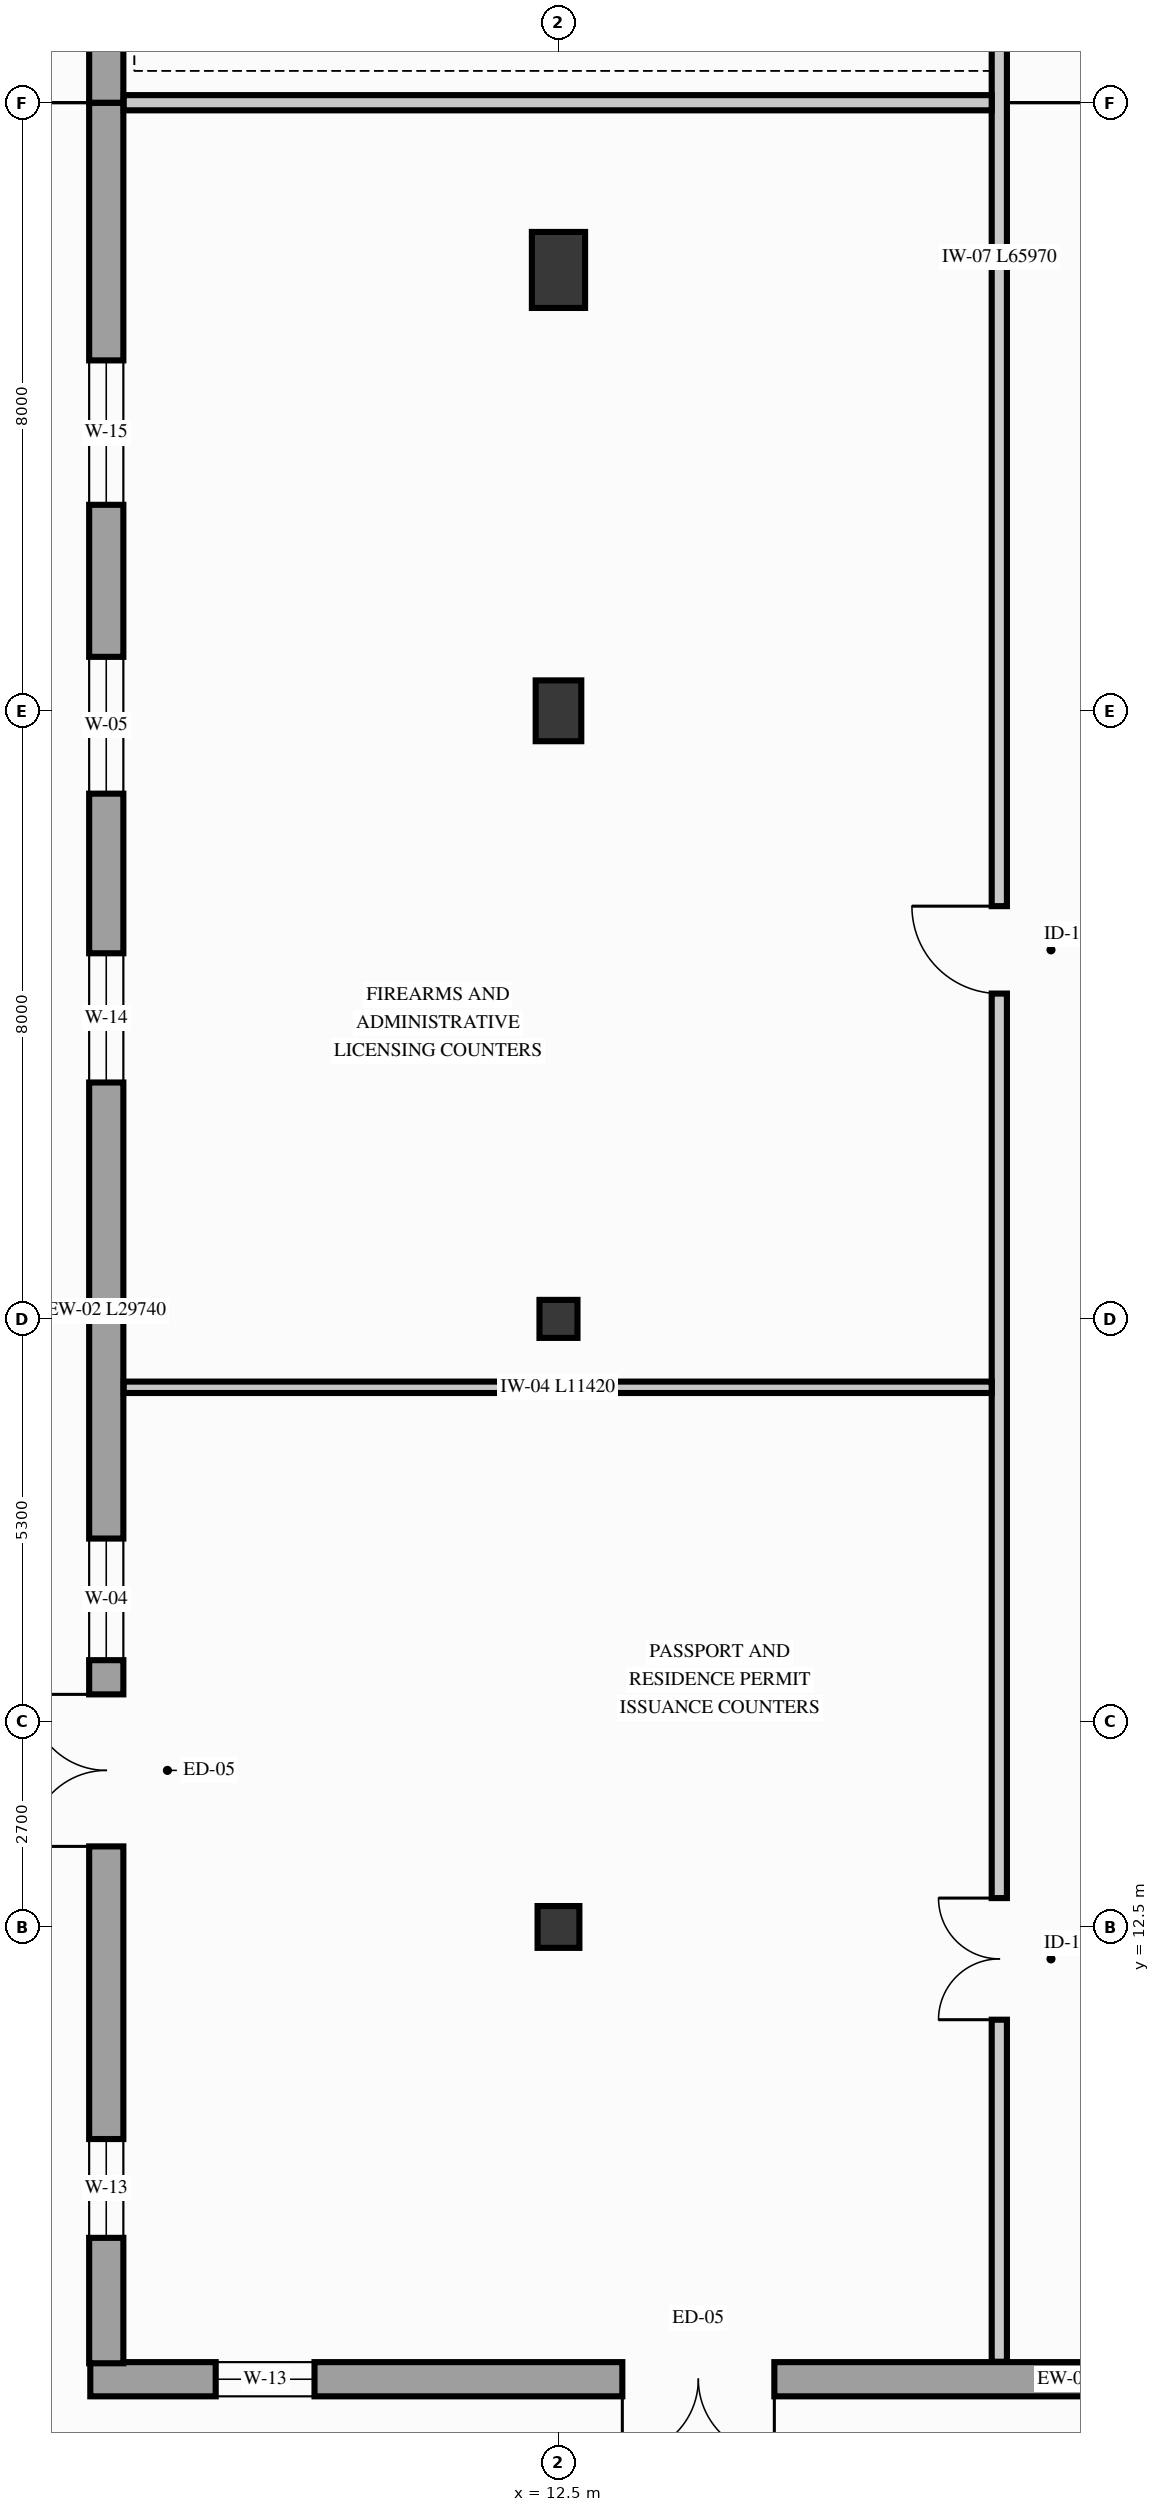
"""IFC4 building model, lengths in metres.
Left out: names, types, materials, properties, quantities, classifications, styles, units other than length and angle.
Written with IfcOpenShell. Run it as: python <this file> out.ifc"""

import sys

from ifc_helpers import new_model, si_unit, direction, frame, frame_2d, origin, origin_2d, place, context, subcontext, project, spatial, rectangle, extrude, element, fill, save


model = new_model("IFC4")
c1 = context("Model", 3, precision=1e-05, world=origin(), true_north=direction((0.0, 1.0)))
c2 = subcontext(c1, "Body", "Model", "MODEL_VIEW")
j1 = project(units=[si_unit("LENGTHUNIT", "METRE"), si_unit("PLANEANGLEUNIT", "RADIAN")], contexts=[c1])
p1 = place(None, origin())
s1 = spatial("IfcSite", under=j1, at=p1, CompositionType="ELEMENT")
p2 = place(p1, origin())
s2 = spatial("IfcBuilding", under=s1, at=p2, CompositionType="ELEMENT")
p3 = place(p2, origin())
s3 = spatial("IfcBuildingStorey", under=s2, at=p3, CompositionType="ELEMENT", Elevation=0.0)
p4 = place(p3, frame((12.5, 12.5, 0.0), z_axis=(0.0, 0.0, 1.0), x_axis=(1.0, 0.0, 0.0)))
e1 = element("IfcColumn", 1, at=p4, inside=s3, PredefinedType="COLUMN", context=c2, shape_type="SweptSolid", body=[
    extrude(rectangle(XDim=0.55, YDim=0.55, at=origin_2d()), origin(), (0.0, 0.0, 1.0), 5.1),
])
p5 = place(p3, frame((12.5, 20.5, 0.0), z_axis=(0.0, 0.0, 1.0), x_axis=(1.0, 0.0, 0.0)))
e2 = element("IfcColumn", 2, at=p5, inside=s3, PredefinedType="COLUMN", context=c2, shape_type="SweptSolid", body=[
    extrude(rectangle(XDim=0.5, YDim=0.5, at=origin_2d()), origin(), (0.0, 0.0, 1.0), 5.1),
])
p6 = place(p3, frame((12.5, 28.5, 0.0), z_axis=(0.0, 0.0, 1.0), x_axis=(1.0, 0.0, 0.0)))
e3 = element("IfcColumn", 3, at=p6, inside=s3, PredefinedType="COLUMN", context=c2, shape_type="SweptSolid", body=[
    extrude(rectangle(XDim=0.6, YDim=0.8, at=origin_2d()), origin(), (0.0, 0.0, 1.0), 5.1),
])
p7 = place(p3, frame((12.5, 34.3, 0.0), z_axis=(0.0, 0.0, 1.0), x_axis=(1.0, 0.0, 0.0)))
e4 = element("IfcColumn", 4, at=p7, inside=s3, PredefinedType="COLUMN", context=c2, shape_type="SweptSolid", body=[
    extrude(rectangle(XDim=0.7, YDim=1.0, at=origin_2d()), origin(), (0.0, 0.0, 1.0), 5.1),
])
p8 = place(p3, frame((6.34, 6.55, 0.0), z_axis=(0.0, 0.0, 1.0), x_axis=(1.0, 0.0, 0.0)))
e5 = element("IfcWall", 5, at=p8, inside=s3, PredefinedType="SOLIDWALL", context=c2, shape_type="SweptSolid", body=[
    extrude(rectangle(XDim=28.25, YDim=0.45, at=frame_2d((14.125, 0.0))), origin(), (0.0, 0.0, 1.0), 4.428),
])
p9 = place(p8, frame((9.0, 0.0, 0.0), z_axis=(0.0, 0.0, 1.0), x_axis=(-1.0, 0.0, 0.0)))
e6 = element("IfcOpeningElement", 6, at=p9, cuts=e5, PredefinedType="OPENING", context=c2, shape_type="SweptSolid", body=[
    extrude(rectangle(XDim=2.0, YDim=2.5, at=frame_2d((1.0, 1.25))), frame((0.0, 0.235, 0.0), z_axis=(0.0, -1.0, 0.0), x_axis=(1.0, 0.0, 0.0)), (0.0, 0.0, 1.0), 0.47),
])
p10 = place(p8, frame((18.7, 0.0, 0.0), z_axis=(0.0, 0.0, 1.0), x_axis=(-1.0, 0.0, 0.0)))
e7 = element("IfcOpeningElement", 7, at=p10, cuts=e5, PredefinedType="OPENING", context=c2, shape_type="SweptSolid", body=[
    extrude(rectangle(XDim=1.2, YDim=2.3, at=frame_2d((0.6, 1.15))), frame((0.0, 0.235, 0.0), z_axis=(0.0, -1.0, 0.0), x_axis=(1.0, 0.0, 0.0)), (0.0, 0.0, 1.0), 0.47),
])
p11 = place(p8, frame((1.65, 0.0, 0.85)))
e8 = element("IfcOpeningElement", 8, at=p11, cuts=e5, PredefinedType="OPENING", context=c2, shape_type="SweptSolid", body=[
    extrude(rectangle(XDim=1.3, YDim=2.15, at=frame_2d((0.65, 1.075))), frame((0.0, 0.235, 0.0), z_axis=(0.0, -1.0, 0.0), x_axis=(1.0, 0.0, 0.0)), (0.0, 0.0, 1.0), 0.47),
])
p12 = place(p8, frame((20.65, 0.0, 0.85)))
e9 = element("IfcOpeningElement", 9, at=p12, cuts=e5, PredefinedType="OPENING", context=c2, shape_type="SweptSolid", body=[
    extrude(rectangle(XDim=1.8, YDim=2.4, at=frame_2d((0.9, 1.2))), frame((0.0, 0.235, 0.0), z_axis=(0.0, -1.0, 0.0), x_axis=(1.0, 0.0, 0.0)), (0.0, 0.0, 1.0), 0.47),
])
p13 = place(p8, frame((24.45, 0.0, 0.85)))
e10 = element("IfcOpeningElement", 10, at=p13, cuts=e5, PredefinedType="OPENING", context=c2, shape_type="SweptSolid", body=[
    extrude(rectangle(XDim=1.9, YDim=2.45, at=frame_2d((0.95, 1.225))), frame((0.0, 0.235, 0.0), z_axis=(0.0, -1.0, 0.0), x_axis=(1.0, 0.0, 0.0)), (0.0, 0.0, 1.0), 0.47),
])
p14 = place(p3, frame((6.55, 6.76, 0.0), z_axis=(0.0, 0.0, 1.0), x_axis=(0.0, 1.0, 0.0)))
e11 = element("IfcWall", 11, at=p14, inside=s3, PredefinedType="SOLIDWALL", context=c2, shape_type="SweptSolid", body=[
    extrude(rectangle(XDim=29.74, YDim=0.45, at=frame_2d((14.87, 0.0))), origin(), (0.0, 0.0, 1.0), 4.418),
])
p15 = place(p14, frame((6.8, 0.0, 0.0)))
e12 = element("IfcOpeningElement", 12, at=p15, cuts=e11, PredefinedType="OPENING", context=c2, shape_type="SweptSolid", body=[
    extrude(rectangle(XDim=2.0, YDim=2.5, at=frame_2d((1.0, 1.25))), frame((0.0, 0.235, 0.0), z_axis=(0.0, -1.0, 0.0), x_axis=(1.0, 0.0, 0.0)), (0.0, 0.0, 1.0), 0.47),
])
p16 = place(p14, frame((1.65, 0.0, 0.85)))
e13 = element("IfcOpeningElement", 13, at=p16, cuts=e11, PredefinedType="OPENING", context=c2, shape_type="SweptSolid", body=[
    extrude(rectangle(XDim=1.3, YDim=2.15, at=frame_2d((0.65, 1.075))), frame((0.0, 0.235, 0.0), z_axis=(0.0, -1.0, 0.0), x_axis=(1.0, 0.0, 0.0)), (0.0, 0.0, 1.0), 0.47),
])
p17 = place(p14, frame((9.25, 0.0, 0.85)))
e14 = element("IfcOpeningElement", 14, at=p17, cuts=e11, PredefinedType="OPENING", context=c2, shape_type="SweptSolid", body=[
    extrude(rectangle(XDim=1.6, YDim=2.4, at=frame_2d((0.8, 1.2))), frame((0.0, 0.235, 0.0), z_axis=(0.0, -1.0, 0.0), x_axis=(1.0, 0.0, 0.0)), (0.0, 0.0, 1.0), 0.47),
])
p18 = place(p14, frame((16.85, 0.0, 0.85)))
e15 = element("IfcOpeningElement", 15, at=p18, cuts=e11, PredefinedType="OPENING", context=c2, shape_type="SweptSolid", body=[
    extrude(rectangle(XDim=1.7, YDim=2.35, at=frame_2d((0.85, 1.175))), frame((0.0, 0.235, 0.0), z_axis=(0.0, -1.0, 0.0), x_axis=(1.0, 0.0, 0.0)), (0.0, 0.0, 1.0), 0.47),
])
p19 = place(p14, frame((20.65, 0.0, 0.85)))
e16 = element("IfcOpeningElement", 16, at=p19, cuts=e11, PredefinedType="OPENING", context=c2, shape_type="SweptSolid", body=[
    extrude(rectangle(XDim=1.8, YDim=2.4, at=frame_2d((0.9, 1.2))), frame((0.0, 0.235, 0.0), z_axis=(0.0, -1.0, 0.0), x_axis=(1.0, 0.0, 0.0)), (0.0, 0.0, 1.0), 0.47),
])
p20 = place(p14, frame((24.45, 0.0, 0.85)))
e17 = element("IfcOpeningElement", 17, at=p20, cuts=e11, PredefinedType="OPENING", context=c2, shape_type="SweptSolid", body=[
    extrude(rectangle(XDim=1.9, YDim=2.45, at=frame_2d((0.95, 1.225))), frame((0.0, 0.235, 0.0), z_axis=(0.0, -1.0, 0.0), x_axis=(1.0, 0.0, 0.0)), (0.0, 0.0, 1.0), 0.47),
])
p21 = place(p3, frame((6.55, 36.5, 0.0), z_axis=(0.0, 0.0, 1.0), x_axis=(0.0, 1.0, 0.0)))
e18 = element("IfcWall", 18, at=p21, inside=s3, PredefinedType="SOLIDWALL", context=c2, shape_type="SweptSolid", body=[
    extrude(rectangle(XDim=47.0, YDim=0.45, at=frame_2d((23.5, 0.0))), origin(), (0.0, 0.0, 1.0), 4.368),
])
p22 = place(p21, frame((40.5, 0.0, 0.0)))
e19 = element("IfcOpeningElement", 19, at=p22, cuts=e18, PredefinedType="OPENING", context=c2, shape_type="SweptSolid", body=[
    extrude(rectangle(XDim=1.8, YDim=2.4, at=frame_2d((0.9, 1.2))), frame((0.0, 0.235, 0.0), z_axis=(0.0, -1.0, 0.0), x_axis=(1.0, 0.0, 0.0)), (0.0, 0.0, 1.0), 0.47),
])
p23 = place(p21, frame((1.65, 0.0, 0.85)))
e20 = element("IfcOpeningElement", 20, at=p23, cuts=e18, PredefinedType="OPENING", context=c2, shape_type="SweptSolid", body=[
    extrude(rectangle(XDim=1.6, YDim=2.4, at=frame_2d((0.8, 1.2))), frame((0.0, 0.235, 0.0), z_axis=(0.0, -1.0, 0.0), x_axis=(1.0, 0.0, 0.0)), (0.0, 0.0, 1.0), 0.47),
])
p24 = place(p21, frame((5.5, 0.0, 0.85)))
e21 = element("IfcOpeningElement", 21, at=p24, cuts=e18, PredefinedType="OPENING", context=c2, shape_type="SweptSolid", body=[
    extrude(rectangle(XDim=1.8, YDim=2.4, at=frame_2d((0.9, 1.2))), frame((0.0, 0.235, 0.0), z_axis=(0.0, -1.0, 0.0), x_axis=(1.0, 0.0, 0.0)), (0.0, 0.0, 1.0), 0.47),
])
p25 = place(p21, frame((9.35, 0.0, 0.85)))
e22 = element("IfcOpeningElement", 22, at=p25, cuts=e18, PredefinedType="OPENING", context=c2, shape_type="SweptSolid", body=[
    extrude(rectangle(XDim=1.5, YDim=2.3, at=frame_2d((0.75, 1.15))), frame((0.0, 0.235, 0.0), z_axis=(0.0, -1.0, 0.0), x_axis=(1.0, 0.0, 0.0)), (0.0, 0.0, 1.0), 0.47),
])
p26 = place(p21, frame((13.2, 0.0, 0.85)))
e23 = element("IfcOpeningElement", 23, at=p26, cuts=e18, PredefinedType="OPENING", context=c2, shape_type="SweptSolid", body=[
    extrude(rectangle(XDim=1.4, YDim=2.2, at=frame_2d((0.7, 1.1))), frame((0.0, 0.235, 0.0), z_axis=(0.0, -1.0, 0.0), x_axis=(1.0, 0.0, 0.0)), (0.0, 0.0, 1.0), 0.47),
])
p27 = place(p21, frame((24.75, 0.0, 0.85)))
e24 = element("IfcOpeningElement", 24, at=p27, cuts=e18, PredefinedType="OPENING", context=c2, shape_type="SweptSolid", body=[
    extrude(rectangle(XDim=1.6, YDim=2.4, at=frame_2d((0.8, 1.2))), frame((0.0, 0.235, 0.0), z_axis=(0.0, -1.0, 0.0), x_axis=(1.0, 0.0, 0.0)), (0.0, 0.0, 1.0), 0.47),
])
p28 = place(p21, frame((28.6, 0.0, 0.85)))
e25 = element("IfcOpeningElement", 25, at=p28, cuts=e18, PredefinedType="OPENING", context=c2, shape_type="SweptSolid", body=[
    extrude(rectangle(XDim=1.8, YDim=2.4, at=frame_2d((0.9, 1.2))), frame((0.0, 0.235, 0.0), z_axis=(0.0, -1.0, 0.0), x_axis=(1.0, 0.0, 0.0)), (0.0, 0.0, 1.0), 0.47),
])
p29 = place(p21, frame((32.45, 0.0, 0.85)))
e26 = element("IfcOpeningElement", 26, at=p29, cuts=e18, PredefinedType="OPENING", context=c2, shape_type="SweptSolid", body=[
    extrude(rectangle(XDim=1.5, YDim=2.3, at=frame_2d((0.75, 1.15))), frame((0.0, 0.235, 0.0), z_axis=(0.0, -1.0, 0.0), x_axis=(1.0, 0.0, 0.0)), (0.0, 0.0, 1.0), 0.47),
])
p30 = place(p3, frame((18.3, 6.78, 0.0), z_axis=(0.0, 0.0, 1.0), x_axis=(0.0, 1.0, 0.0)))
e27 = element("IfcWall", 27, at=p30, inside=s3, PredefinedType="PARTITIONING", context=c2, shape_type="SweptSolid", body=[
    extrude(rectangle(XDim=65.97, YDim=0.2, at=frame_2d((32.985, 0.0))), origin(), (0.0, 0.0, 1.0), 4.368),
])
p31 = place(p30, frame((4.5, 0.0, 0.0)))
e28 = element("IfcOpeningElement", 28, at=p31, cuts=e27, PredefinedType="OPENING", context=c2, shape_type="SweptSolid", body=[
    extrude(rectangle(XDim=1.6, YDim=2.3, at=frame_2d((0.8, 1.15))), frame((0.0, 0.11, 0.0), z_axis=(0.0, -1.0, 0.0), x_axis=(1.0, 0.0, 0.0)), (0.0, 0.0, 1.0), 0.22),
])
p32 = place(p30, frame((18.0, 0.0, 0.0)))
e29 = element("IfcOpeningElement", 29, at=p32, cuts=e27, PredefinedType="OPENING", context=c2, shape_type="SweptSolid", body=[
    extrude(rectangle(XDim=1.15, YDim=2.2, at=frame_2d((0.575, 1.1))), frame((0.0, 0.11, 0.0), z_axis=(0.0, -1.0, 0.0), x_axis=(1.0, 0.0, 0.0)), (0.0, 0.0, 1.0), 0.22),
])
p33 = place(p30, frame((38.0, 0.0, 0.0)))
e30 = element("IfcOpeningElement", 30, at=p33, cuts=e27, PredefinedType="OPENING", context=c2, shape_type="SweptSolid", body=[
    extrude(rectangle(XDim=0.98, YDim=2.16, at=frame_2d((0.49, 1.08))), frame((0.0, 0.11, 0.0), z_axis=(0.0, -1.0, 0.0), x_axis=(1.0, 0.0, 0.0)), (0.0, 0.0, 1.0), 0.22),
])
p34 = place(p30, frame((56.0, 0.0, 0.0)))
e31 = element("IfcOpeningElement", 31, at=p34, cuts=e27, PredefinedType="OPENING", context=c2, shape_type="SweptSolid", body=[
    extrude(rectangle(XDim=1.15, YDim=2.2, at=frame_2d((0.575, 1.1))), frame((0.0, 0.11, 0.0), z_axis=(0.0, -1.0, 0.0), x_axis=(1.0, 0.0, 0.0)), (0.0, 0.0, 1.0), 0.22),
])
p35 = place(p3, frame((6.78, 19.6, 0.0), z_axis=(0.0, 0.0, 1.0), x_axis=(1.0, 0.0, 0.0)))
e32 = element("IfcWall", 32, at=p35, inside=s3, PredefinedType="PARTITIONING", context=c2, shape_type="SweptSolid", body=[
    extrude(rectangle(XDim=11.42, YDim=0.15, at=frame_2d((5.71, 0.0))), origin(), (0.0, 0.0, 1.0), 4.428),
])
p36 = place(p3, frame((6.78, 36.5, 0.0), z_axis=(0.0, 0.0, 1.0), x_axis=(1.0, 0.0, 0.0)))
e33 = element("IfcWall", 33, at=p36, inside=s3, PredefinedType="PARTITIONING", context=c2, shape_type="SweptSolid", body=[
    extrude(rectangle(XDim=11.42, YDim=0.2, at=frame_2d((5.71, 0.0))), origin(), (0.0, 0.0, 1.0), 4.86),
])
p37 = place(p9, origin())
e34 = element("IfcDoor", 34, at=p37, inside=s3, OperationType="DOUBLE_DOOR_SINGLE_SWING", PredefinedType="DOOR", context=c2, shape_type="SweptSolid", body=[
    extrude(rectangle(XDim=2.0, YDim=2.5, at=frame_2d((1.0, 1.25))), frame((0.0, 0.025, 0.0), z_axis=(0.0, -1.0, 0.0), x_axis=(1.0, 0.0, 0.0)), (0.0, 0.0, 1.0), 0.05),
])
fill(e6, e34)
p38 = place(p15, origin())
e35 = element("IfcDoor", 35, at=p38, inside=s3, OperationType="DOUBLE_DOOR_SINGLE_SWING", PredefinedType="DOOR", context=c2, shape_type="SweptSolid", body=[
    extrude(rectangle(XDim=2.0, YDim=2.5, at=frame_2d((1.0, 1.25))), frame((0.0, 0.025, 0.0), z_axis=(0.0, -1.0, 0.0), x_axis=(1.0, 0.0, 0.0)), (0.0, 0.0, 1.0), 0.05),
])
fill(e12, e35)
p39 = place(p11, origin())
e36 = element("IfcWindow", 36, at=p39, inside=s3, PartitioningType="SINGLE_PANEL", PredefinedType="WINDOW", context=c2, shape_type="SweptSolid", body=[
    extrude(rectangle(XDim=1.3, YDim=2.15, at=frame_2d((0.65, 1.075))), frame((0.0, 0.03, 0.0), z_axis=(0.0, -1.0, 0.0), x_axis=(1.0, 0.0, 0.0)), (0.0, 0.0, 1.0), 0.06),
])
fill(e8, e36)
p40 = place(p16, origin())
e37 = element("IfcWindow", 37, at=p40, inside=s3, PartitioningType="SINGLE_PANEL", PredefinedType="WINDOW", context=c2, shape_type="SweptSolid", body=[
    extrude(rectangle(XDim=1.3, YDim=2.15, at=frame_2d((0.65, 1.075))), frame((0.0, 0.03, 0.0), z_axis=(0.0, -1.0, 0.0), x_axis=(1.0, 0.0, 0.0)), (0.0, 0.0, 1.0), 0.06),
])
fill(e13, e37)
p41 = place(p17, origin())
e38 = element("IfcWindow", 38, at=p41, inside=s3, PartitioningType="SINGLE_PANEL", PredefinedType="WINDOW", context=c2, shape_type="SweptSolid", body=[
    extrude(rectangle(XDim=1.6, YDim=2.4, at=frame_2d((0.8, 1.2))), frame((0.0, 0.03, 0.0), z_axis=(0.0, -1.0, 0.0), x_axis=(1.0, 0.0, 0.0)), (0.0, 0.0, 1.0), 0.06),
])
fill(e14, e38)
p42 = place(p18, origin())
e39 = element("IfcWindow", 39, at=p42, inside=s3, PartitioningType="SINGLE_PANEL", PredefinedType="WINDOW", context=c2, shape_type="SweptSolid", body=[
    extrude(rectangle(XDim=1.7, YDim=2.35, at=frame_2d((0.85, 1.175))), frame((0.0, 0.03, 0.0), z_axis=(0.0, -1.0, 0.0), x_axis=(1.0, 0.0, 0.0)), (0.0, 0.0, 1.0), 0.06),
])
fill(e15, e39)
p43 = place(p19, origin())
e40 = element("IfcWindow", 40, at=p43, inside=s3, PartitioningType="SINGLE_PANEL", PredefinedType="WINDOW", context=c2, shape_type="SweptSolid", body=[
    extrude(rectangle(XDim=1.8, YDim=2.4, at=frame_2d((0.9, 1.2))), frame((0.0, 0.03, 0.0), z_axis=(0.0, -1.0, 0.0), x_axis=(1.0, 0.0, 0.0)), (0.0, 0.0, 1.0), 0.06),
])
fill(e16, e40)
p44 = place(p20, origin())
e41 = element("IfcWindow", 41, at=p44, inside=s3, PartitioningType="SINGLE_PANEL", PredefinedType="WINDOW", context=c2, shape_type="SweptSolid", body=[
    extrude(rectangle(XDim=1.9, YDim=2.45, at=frame_2d((0.95, 1.225))), frame((0.0, 0.03, 0.0), z_axis=(0.0, -1.0, 0.0), x_axis=(1.0, 0.0, 0.0)), (0.0, 0.0, 1.0), 0.06),
])
fill(e17, e41)
p45 = place(p31, origin())
e42 = element("IfcDoor", 42, at=p45, inside=s3, OperationType="DOUBLE_DOOR_SINGLE_SWING", PredefinedType="DOOR", context=c2, shape_type="SweptSolid", body=[
    extrude(rectangle(XDim=1.6, YDim=2.3, at=frame_2d((0.8, 1.15))), frame((0.0, 0.025, 0.0), z_axis=(0.0, -1.0, 0.0), x_axis=(1.0, 0.0, 0.0)), (0.0, 0.0, 1.0), 0.05),
])
fill(e28, e42)
p46 = place(p32, origin())
e43 = element("IfcDoor", 43, at=p46, inside=s3, OperationType="SINGLE_SWING_RIGHT", PredefinedType="DOOR", context=c2, shape_type="SweptSolid", body=[
    extrude(rectangle(XDim=1.15, YDim=2.2, at=frame_2d((0.575, 1.1))), frame((0.0, 0.025, 0.0), z_axis=(0.0, -1.0, 0.0), x_axis=(1.0, 0.0, 0.0)), (0.0, 0.0, 1.0), 0.05),
])
fill(e29, e43)
save(model, sys.argv[1])
